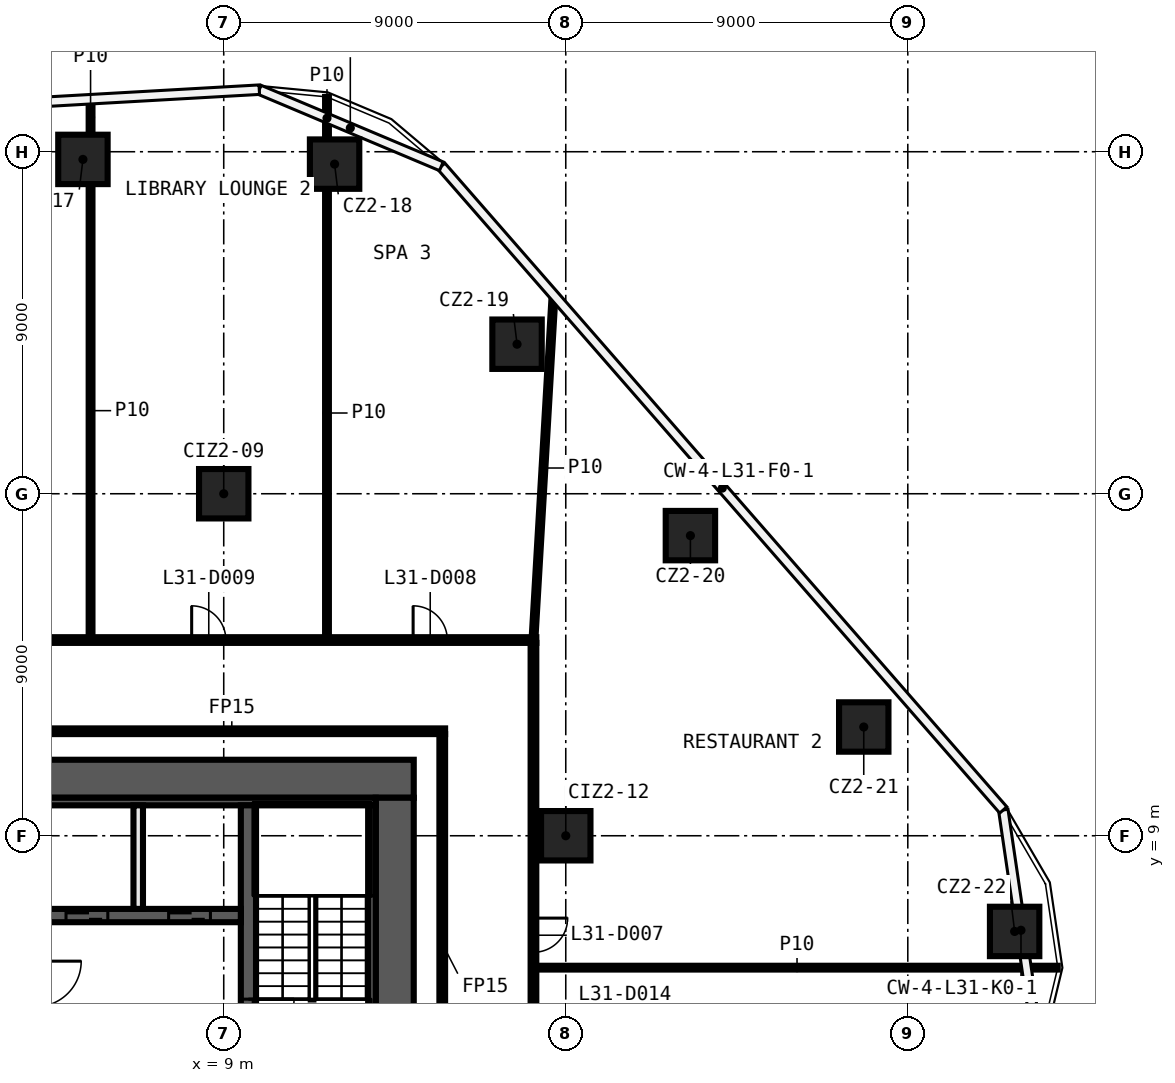
"""IFC4 building model, lengths in metres.
Left out: names, types, materials, properties, quantities, classifications, styles, units other than length and angle.
Written with IfcOpenShell. Run it as: python <this file> out.ifc"""

import sys

from ifc_helpers import new_model, si_unit, direction, frame, frame_2d, origin, origin_2d, place, context, subcontext, project, spatial, rectangle, extrude, element, fill, save


model = new_model("IFC4")
c1 = context("Model", 3, precision=1e-05, world=origin(), true_north=direction((0.0, 1.0)))
c2 = subcontext(c1, "Body", "Model", "MODEL_VIEW")
j1 = project(units=[si_unit("LENGTHUNIT", "METRE"), si_unit("PLANEANGLEUNIT", "RADIAN")], contexts=[c1])
p1 = place(None, origin())
s1 = spatial("IfcSite", under=j1, at=p1, CompositionType="ELEMENT")
p2 = place(p1, origin())
s2 = spatial("IfcBuilding", under=s1, at=p2, CompositionType="ELEMENT")
p3 = place(p2, frame((0.0, 0.0, 139.6)))
s3 = spatial("IfcBuildingStorey", under=s2, at=p3, CompositionType="ELEMENT", Elevation=139.6)
for number, where, z_axis, x_axis in (
    (1, (5.295, 26.798, 0.0), (0.0, 0.0, 1.0), (1.0, 0.0, 0.0)),
    (2, (11.917, 26.674, 0.0), (0.0, 0.0, 1.0), (1.0, 0.0, 0.0)),
    (3, (16.718, 21.935, 0.0), (0.0, 0.0, 1.0), (1.0, 0.0, 0.0)),
    (4, (21.28, 16.898, 0.0), (0.0, 0.0, 1.0), (1.0, 0.0, 0.0)),
    (5, (25.841, 11.862, 0.0), (0.0, 0.0, 1.0), (1.0, 0.0, 0.0)),
    (6, (29.811, 6.482, 0.0), (0.0, 0.0, 1.0), (1.0, 0.0, 0.0)),
    (7, (9.0, 18.0, 0.0), (0.0, 0.0, 1.0), (1.0, 0.0, 0.0)),
    (8, (18.0, 9.0, 0.0), (0.0, 0.0, 1.0), (1.0, 0.0, 0.0)),
):
    element("IfcColumn", number, at=place(p3, frame(where, z_axis=z_axis, x_axis=x_axis)), inside=s3, PredefinedType="COLUMN", context=c2, shape_type="SweptSolid", body=[
        extrude(rectangle(XDim=1.3, YDim=1.3, at=origin_2d()), origin(), (0.0, 0.0, 1.0), 5.4),
    ])
p4 = place(p3, frame((17.225, 5.529, 0.0), z_axis=(0.0, 0.0, 1.0), x_axis=(1.0, 0.0, 0.0)))
e9 = element("IfcWall", 9, at=p4, inside=s3, PredefinedType="PARTITIONING", context=c2, shape_type="SweptSolid", body=[
    extrude(rectangle(XDim=13.721, YDim=0.1, at=frame_2d((6.86, 0.0))), origin(), (0.0, 0.0, 1.0), 5.4),
])
p5 = place(p3, frame((3.6, 11.75, 0.0), z_axis=(0.0, 0.0, 1.0), x_axis=(1.0, 0.0, 0.0)))
e10 = element("IfcWall", 10, at=p5, inside=s3, PredefinedType="PARTITIONING", context=c2, shape_type="SweptSolid", body=[
    extrude(rectangle(XDim=11.225, YDim=0.15, at=frame_2d((5.612, 0.0))), origin(), (0.0, 0.0, 1.0), 5.4),
])
p6 = place(p3, frame((-17.225, 14.15, 0.0), z_axis=(0.0, 0.0, 1.0), x_axis=(1.0, 0.0, 0.0)))
e11 = element("IfcWall", 11, at=p6, inside=s3, PredefinedType="PARTITIONING", context=c2, shape_type="SweptSolid", body=[
    extrude(rectangle(XDim=34.45, YDim=0.15, at=frame_2d((17.225, 0.0))), origin(), (0.0, 0.0, 1.0), 5.4),
])
p7 = place(p6, frame((31.208, 0.0, 0.0)))
e12 = element("IfcOpeningElement", 12, at=p7, cuts=e11, PredefinedType="OPENING", context=c2, shape_type="SweptSolid", body=[
    extrude(rectangle(XDim=0.9, YDim=2.1, at=frame_2d((0.45, 1.05))), frame((0.0, 0.085, 0.0), z_axis=(0.0, -1.0, 0.0), x_axis=(1.0, 0.0, 0.0)), (0.0, 0.0, 1.0), 0.17),
])
p8 = place(p6, frame((25.381, 0.0, 0.0)))
e13 = element("IfcOpeningElement", 13, at=p8, cuts=e11, PredefinedType="OPENING", context=c2, shape_type="SweptSolid", body=[
    extrude(rectangle(XDim=0.9, YDim=2.1, at=frame_2d((0.45, 1.05))), frame((0.0, 0.085, 0.0), z_axis=(0.0, -1.0, 0.0), x_axis=(1.0, 0.0, 0.0)), (0.0, 0.0, 1.0), 0.17),
])
p9 = place(p6, frame((17.823, 0.0, 0.0)))
e14 = element("IfcOpeningElement", 14, at=p9, cuts=e11, PredefinedType="OPENING", context=c2, shape_type="SweptSolid", body=[
    extrude(rectangle(XDim=0.9, YDim=2.1, at=frame_2d((0.45, 1.05))), frame((0.0, 0.085, 0.0), z_axis=(0.0, -1.0, 0.0), x_axis=(1.0, 0.0, 0.0)), (0.0, 0.0, 1.0), 0.17),
])
p10 = place(p3, frame((17.149, 14.15, 0.0), z_axis=(0.0, 0.0, 1.0), x_axis=(0.058278603103, 0.998300357818, 0.0)))
e15 = element("IfcWall", 15, at=p10, inside=s3, PredefinedType="PARTITIONING", context=c2, shape_type="SweptSolid", body=[
    extrude(rectangle(XDim=9.07, YDim=0.1, at=frame_2d((4.535, 0.0))), origin(), (0.0, 0.0, 1.0), 5.4),
])
p11 = place(p3, frame((17.15, 14.075, 0.0), z_axis=(0.0, 0.0, 1.0), x_axis=(0.0, -1.0, 0.0)))
e16 = element("IfcWall", 16, at=p11, inside=s3, PredefinedType="PARTITIONING", context=c2, shape_type="SweptSolid", body=[
    extrude(rectangle(XDim=28.15, YDim=0.15, at=frame_2d((14.075, 0.0))), origin(), (0.0, 0.0, 1.0), 5.4),
])
p12 = place(p11, frame((18.235, 0.0, 0.0)))
e17 = element("IfcOpeningElement", 17, at=p12, cuts=e16, PredefinedType="OPENING", context=c2, shape_type="SweptSolid", body=[
    extrude(rectangle(XDim=0.9, YDim=2.1, at=frame_2d((0.45, 1.05))), frame((0.0, 0.085, 0.0), z_axis=(0.0, -1.0, 0.0), x_axis=(1.0, 0.0, 0.0)), (0.0, 0.0, 1.0), 0.17),
])
p13 = place(p11, frame((11.174, 0.0, 0.0)))
e18 = element("IfcOpeningElement", 18, at=p13, cuts=e16, PredefinedType="OPENING", context=c2, shape_type="SweptSolid", body=[
    extrude(rectangle(XDim=0.9, YDim=2.1, at=frame_2d((0.45, 1.05))), frame((0.0, 0.085, 0.0), z_axis=(0.0, -1.0, 0.0), x_axis=(1.0, 0.0, 0.0)), (0.0, 0.0, 1.0), 0.17),
])
p14 = place(p11, frame((7.242, 0.0, 0.0)))
e19 = element("IfcOpeningElement", 19, at=p14, cuts=e16, PredefinedType="OPENING", context=c2, shape_type="SweptSolid", body=[
    extrude(rectangle(XDim=0.9, YDim=2.1, at=frame_2d((0.45, 1.05))), frame((0.0, 0.085, 0.0), z_axis=(0.0, -1.0, 0.0), x_axis=(1.0, 0.0, 0.0)), (0.0, 0.0, 1.0), 0.17),
])
p15 = place(p3, frame((14.75, -11.675, 0.0), z_axis=(0.0, 0.0, 1.0), x_axis=(0.0, 1.0, 0.0)))
e20 = element("IfcWall", 20, at=p15, inside=s3, PredefinedType="PARTITIONING", context=c2, shape_type="SweptSolid", body=[
    extrude(rectangle(XDim=23.35, YDim=0.15, at=frame_2d((11.675, 0.0))), origin(), (0.0, 0.0, 1.0), 5.4),
])
p16 = place(p15, frame((11.225, 0.0, 0.0)))
e21 = element("IfcOpeningElement", 21, at=p16, cuts=e20, PredefinedType="OPENING", context=c2, shape_type="SweptSolid", body=[
    extrude(rectangle(XDim=0.9, YDim=2.1, at=frame_2d((0.45, 1.05))), frame((0.0, 0.085, 0.0), z_axis=(0.0, -1.0, 0.0), x_axis=(1.0, 0.0, 0.0)), (0.0, 0.0, 1.0), 0.17),
])
p17 = place(p3, frame((11.717, 14.225, 0.0), z_axis=(0.0, 0.0, 1.0), x_axis=(0.0, 1.0, 0.0)))
e22 = element("IfcWall", 22, at=p17, inside=s3, PredefinedType="PARTITIONING", context=c2, shape_type="SweptSolid", body=[
    extrude(rectangle(XDim=11.799, YDim=0.1, at=frame_2d((5.899, 0.0))), origin(), (0.0, 0.0, 1.0), 5.4),
])
p18 = place(p3, frame((11.717, 27.324, 0.0), z_axis=(0.0, 0.0, 1.0), x_axis=(0.0, 1.0, 0.0)))
e23 = element("IfcWall", 23, at=p18, inside=s3, PredefinedType="PARTITIONING", context=c2, shape_type="SweptSolid", body=[
    extrude(rectangle(XDim=1.117, YDim=0.1, at=frame_2d((0.559, 0.0))), origin(), (0.0, 0.0, 1.0), 5.4),
])
p19 = place(p3, frame((5.496, 14.225, 0.0), z_axis=(0.0, 0.0, 1.0), x_axis=(0.0, 1.0, 0.0)))
e24 = element("IfcWall", 24, at=p19, inside=s3, PredefinedType="PARTITIONING", context=c2, shape_type="SweptSolid", body=[
    extrude(rectangle(XDim=11.923, YDim=0.1, at=frame_2d((5.961, 0.0))), origin(), (0.0, 0.0, 1.0), 5.4),
])
p20 = place(p3, frame((5.496, 27.448, 0.0), z_axis=(0.0, 0.0, 1.0), x_axis=(0.0, 1.0, 0.0)))
e25 = element("IfcWall", 25, at=p20, inside=s3, PredefinedType="PARTITIONING", context=c2, shape_type="SweptSolid", body=[
    extrude(rectangle(XDim=0.914, YDim=0.1, at=frame_2d((0.457, 0.0))), origin(), (0.0, 0.0, 1.0), 5.4),
])
p21 = place(p3, frame((-14.0, 10.5, 0.0), z_axis=(0.0, 0.0, 1.0), x_axis=(1.0, 0.0, 0.0)))
e26 = element("IfcWall", 26, at=p21, inside=s3, PredefinedType="SHEAR", context=c2, shape_type="SweptSolid", body=[
    extrude(rectangle(XDim=28.0, YDim=1.0, at=frame_2d((14.0, 0.0))), origin(), (0.0, 0.0, 1.0), 5.4),
])
p22 = place(p21, frame((15.9, 0.0, 0.0)))
e27 = element("IfcOpeningElement", 27, at=p22, cuts=e26, PredefinedType="OPENING", context=c2, shape_type="SweptSolid", body=[
    extrude(rectangle(XDim=1.6, YDim=2.1, at=frame_2d((0.8, 1.05))), frame((0.0, 0.51, 0.0), z_axis=(0.0, -1.0, 0.0), x_axis=(1.0, 0.0, 0.0)), (0.0, 0.0, 1.0), 1.02),
])
p23 = place(p3, frame((13.5, 10.0, 0.0), z_axis=(0.0, 0.0, 1.0), x_axis=(0.0, -1.0, 0.0)))
e28 = element("IfcWall", 28, at=p23, inside=s3, PredefinedType="SHEAR", context=c2, shape_type="SweptSolid", body=[
    extrude(rectangle(XDim=20.0, YDim=1.0, at=frame_2d((10.0, 0.0))), origin(), (0.0, 0.0, 1.0), 5.4),
])
p24 = place(p3, frame((3.9, 9.9, 0.0), z_axis=(0.0, 0.0, 1.0), x_axis=(1.0, 0.0, 0.0)))
e29 = element("IfcWall", 29, at=p24, inside=s3, PredefinedType="SHEAR", context=c2, shape_type="SweptSolid", body=[
    extrude(rectangle(XDim=9.1, YDim=0.2, at=frame_2d((4.55, 0.0))), origin(), (0.0, 0.0, 1.0), 5.4),
])
p25 = place(p3, frame((12.9, 9.8, 0.0), z_axis=(0.0, 0.0, 1.0), x_axis=(0.0, -1.0, 0.0)))
e30 = element("IfcWall", 30, at=p25, inside=s3, PredefinedType="SHEAR", context=c2, shape_type="SweptSolid", body=[
    extrude(rectangle(XDim=19.6, YDim=0.2, at=frame_2d((9.8, 0.0))), origin(), (0.0, 0.0, 1.0), 5.4),
])
p26 = place(p3, frame((9.65, 9.8, 0.0), z_axis=(0.0, 0.0, 1.0), x_axis=(0.0, -1.0, 0.0)))
e31 = element("IfcWall", 31, at=p26, inside=s3, PredefinedType="SHEAR", context=c2, shape_type="SweptSolid", body=[
    extrude(rectangle(XDim=7.5, YDim=0.4, at=frame_2d((3.75, 0.0))), origin(), (0.0, 0.0, 1.0), 5.4),
])
p27 = place(p26, frame((5.1, 0.0, 0.0)))
e32 = element("IfcOpeningElement", 32, at=p27, cuts=e31, PredefinedType="OPENING", context=c2, shape_type="SweptSolid", body=[
    extrude(rectangle(XDim=1.2, YDim=2.1, at=frame_2d((0.6, 1.05))), frame((0.0, 0.21, 0.0), z_axis=(0.0, -1.0, 0.0), x_axis=(1.0, 0.0, 0.0)), (0.0, 0.0, 1.0), 0.42),
])
p28 = place(p3, frame((-9.45, 6.9, 0.0), z_axis=(0.0, 0.0, 1.0), x_axis=(1.0, 0.0, 0.0)))
e33 = element("IfcWall", 33, at=p28, inside=s3, PredefinedType="SHEAR", context=c2, shape_type="SweptSolid", body=[
    extrude(rectangle(XDim=18.9, YDim=0.35, at=frame_2d((9.45, 0.0))), origin(), (0.0, 0.0, 1.0), 5.4),
])
p29 = place(p28, frame((0.8, 0.0, 0.0)))
e34 = element("IfcOpeningElement", 34, at=p29, cuts=e33, PredefinedType="OPENING", context=c2, shape_type="SweptSolid", body=[
    extrude(rectangle(XDim=1.1, YDim=2.1, at=frame_2d((0.55, 1.05))), frame((0.0, 0.185, 0.0), z_axis=(0.0, -1.0, 0.0), x_axis=(1.0, 0.0, 0.0)), (0.0, 0.0, 1.0), 0.37),
])
p30 = place(p28, frame((3.5, 0.0, 0.0)))
e35 = element("IfcOpeningElement", 35, at=p30, cuts=e33, PredefinedType="OPENING", context=c2, shape_type="SweptSolid", body=[
    extrude(rectangle(XDim=1.1, YDim=2.1, at=frame_2d((0.55, 1.05))), frame((0.0, 0.185, 0.0), z_axis=(0.0, -1.0, 0.0), x_axis=(1.0, 0.0, 0.0)), (0.0, 0.0, 1.0), 0.37),
])
p31 = place(p28, frame((6.2, 0.0, 0.0)))
e36 = element("IfcOpeningElement", 36, at=p31, cuts=e33, PredefinedType="OPENING", context=c2, shape_type="SweptSolid", body=[
    extrude(rectangle(XDim=1.1, YDim=2.1, at=frame_2d((0.55, 1.05))), frame((0.0, 0.185, 0.0), z_axis=(0.0, -1.0, 0.0), x_axis=(1.0, 0.0, 0.0)), (0.0, 0.0, 1.0), 0.37),
])
p32 = place(p28, frame((8.9, 0.0, 0.0)))
e37 = element("IfcOpeningElement", 37, at=p32, cuts=e33, PredefinedType="OPENING", context=c2, shape_type="SweptSolid", body=[
    extrude(rectangle(XDim=1.1, YDim=2.1, at=frame_2d((0.55, 1.05))), frame((0.0, 0.185, 0.0), z_axis=(0.0, -1.0, 0.0), x_axis=(1.0, 0.0, 0.0)), (0.0, 0.0, 1.0), 0.37),
])
p33 = place(p28, frame((11.55, 0.0, 0.0)))
e38 = element("IfcOpeningElement", 38, at=p33, cuts=e33, PredefinedType="OPENING", context=c2, shape_type="SweptSolid", body=[
    extrude(rectangle(XDim=1.2, YDim=2.1, at=frame_2d((0.6, 1.05))), frame((0.0, 0.185, 0.0), z_axis=(0.0, -1.0, 0.0), x_axis=(1.0, 0.0, 0.0)), (0.0, 0.0, 1.0), 0.37),
])
p34 = place(p28, frame((14.3, 0.0, 0.0)))
e39 = element("IfcOpeningElement", 39, at=p34, cuts=e33, PredefinedType="OPENING", context=c2, shape_type="SweptSolid", body=[
    extrude(rectangle(XDim=1.1, YDim=2.1, at=frame_2d((0.55, 1.05))), frame((0.0, 0.185, 0.0), z_axis=(0.0, -1.0, 0.0), x_axis=(1.0, 0.0, 0.0)), (0.0, 0.0, 1.0), 0.37),
])
p35 = place(p28, frame((17.0, 0.0, 0.0)))
e40 = element("IfcOpeningElement", 40, at=p35, cuts=e33, PredefinedType="OPENING", context=c2, shape_type="SweptSolid", body=[
    extrude(rectangle(XDim=1.1, YDim=2.1, at=frame_2d((0.55, 1.05))), frame((0.0, 0.185, 0.0), z_axis=(0.0, -1.0, 0.0), x_axis=(1.0, 0.0, 0.0)), (0.0, 0.0, 1.0), 0.37),
])
p36 = place(p3, frame((6.75, 7.075, 0.0), z_axis=(0.0, 0.0, 1.0), x_axis=(0.0, 1.0, 0.0)))
e41 = element("IfcWall", 41, at=p36, inside=s3, PredefinedType="SOLIDWALL", context=c2, shape_type="SweptSolid", body=[
    extrude(rectangle(XDim=2.725, YDim=0.25, at=frame_2d((1.363, 0.0))), origin(), (0.0, 0.0, 1.0), 5.4),
])
p37 = place(p14, origin())
e42 = element("IfcDoor", 42, at=p37, inside=s3, OperationType="SINGLE_SWING_RIGHT", PredefinedType="DOOR", context=c2, shape_type="SweptSolid", body=[
    extrude(rectangle(XDim=0.9, YDim=2.1, at=frame_2d((0.45, 1.05))), frame((0.0, 0.025, 0.0), z_axis=(0.0, -1.0, 0.0), x_axis=(1.0, 0.0, 0.0)), (0.0, 0.0, 1.0), 0.05),
])
fill(e19, e42)
p38 = place(p7, origin())
e43 = element("IfcDoor", 43, at=p38, inside=s3, OperationType="SINGLE_SWING_LEFT", PredefinedType="DOOR", context=c2, shape_type="SweptSolid", body=[
    extrude(rectangle(XDim=0.9, YDim=2.1, at=frame_2d((0.45, 1.05))), frame((0.0, 0.025, 0.0), z_axis=(0.0, -1.0, 0.0), x_axis=(1.0, 0.0, 0.0)), (0.0, 0.0, 1.0), 0.05),
])
fill(e12, e43)
p39 = place(p8, origin())
e44 = element("IfcDoor", 44, at=p39, inside=s3, OperationType="SINGLE_SWING_RIGHT", PredefinedType="DOOR", context=c2, shape_type="SweptSolid", body=[
    extrude(rectangle(XDim=0.9, YDim=2.1, at=frame_2d((0.45, 1.05))), frame((0.0, 0.025, 0.0), z_axis=(0.0, -1.0, 0.0), x_axis=(1.0, 0.0, 0.0)), (0.0, 0.0, 1.0), 0.05),
])
fill(e13, e44)
p40 = place(p34, origin())
e45 = element("IfcDoor", 45, at=p40, inside=s3, OperationType="DOUBLE_DOOR_SLIDING", PredefinedType="DOOR", context=c2, shape_type="SweptSolid", body=[
    extrude(rectangle(XDim=1.1, YDim=2.1, at=frame_2d((0.55, 1.05))), frame((0.0, 0.025, 0.0), z_axis=(0.0, -1.0, 0.0), x_axis=(1.0, 0.0, 0.0)), (0.0, 0.0, 1.0), 0.05),
])
fill(e39, e45)
p41 = place(p35, origin())
e46 = element("IfcDoor", 46, at=p41, inside=s3, OperationType="DOUBLE_DOOR_SLIDING", PredefinedType="DOOR", context=c2, shape_type="SweptSolid", body=[
    extrude(rectangle(XDim=1.1, YDim=2.1, at=frame_2d((0.55, 1.05))), frame((0.0, 0.025, 0.0), z_axis=(0.0, -1.0, 0.0), x_axis=(1.0, 0.0, 0.0)), (0.0, 0.0, 1.0), 0.05),
])
fill(e40, e46)
p42 = place(p27, origin())
e47 = element("IfcDoor", 47, at=p42, inside=s3, OperationType="SINGLE_SWING_LEFT", PredefinedType="DOOR", context=c2, shape_type="SweptSolid", body=[
    extrude(rectangle(XDim=1.2, YDim=2.1, at=frame_2d((0.6, 1.05))), frame((0.0, 0.025, 0.0), z_axis=(0.0, -1.0, 0.0), x_axis=(1.0, 0.0, 0.0)), (0.0, 0.0, 1.0), 0.05),
])
fill(e32, e47)
save(model, sys.argv[1])
